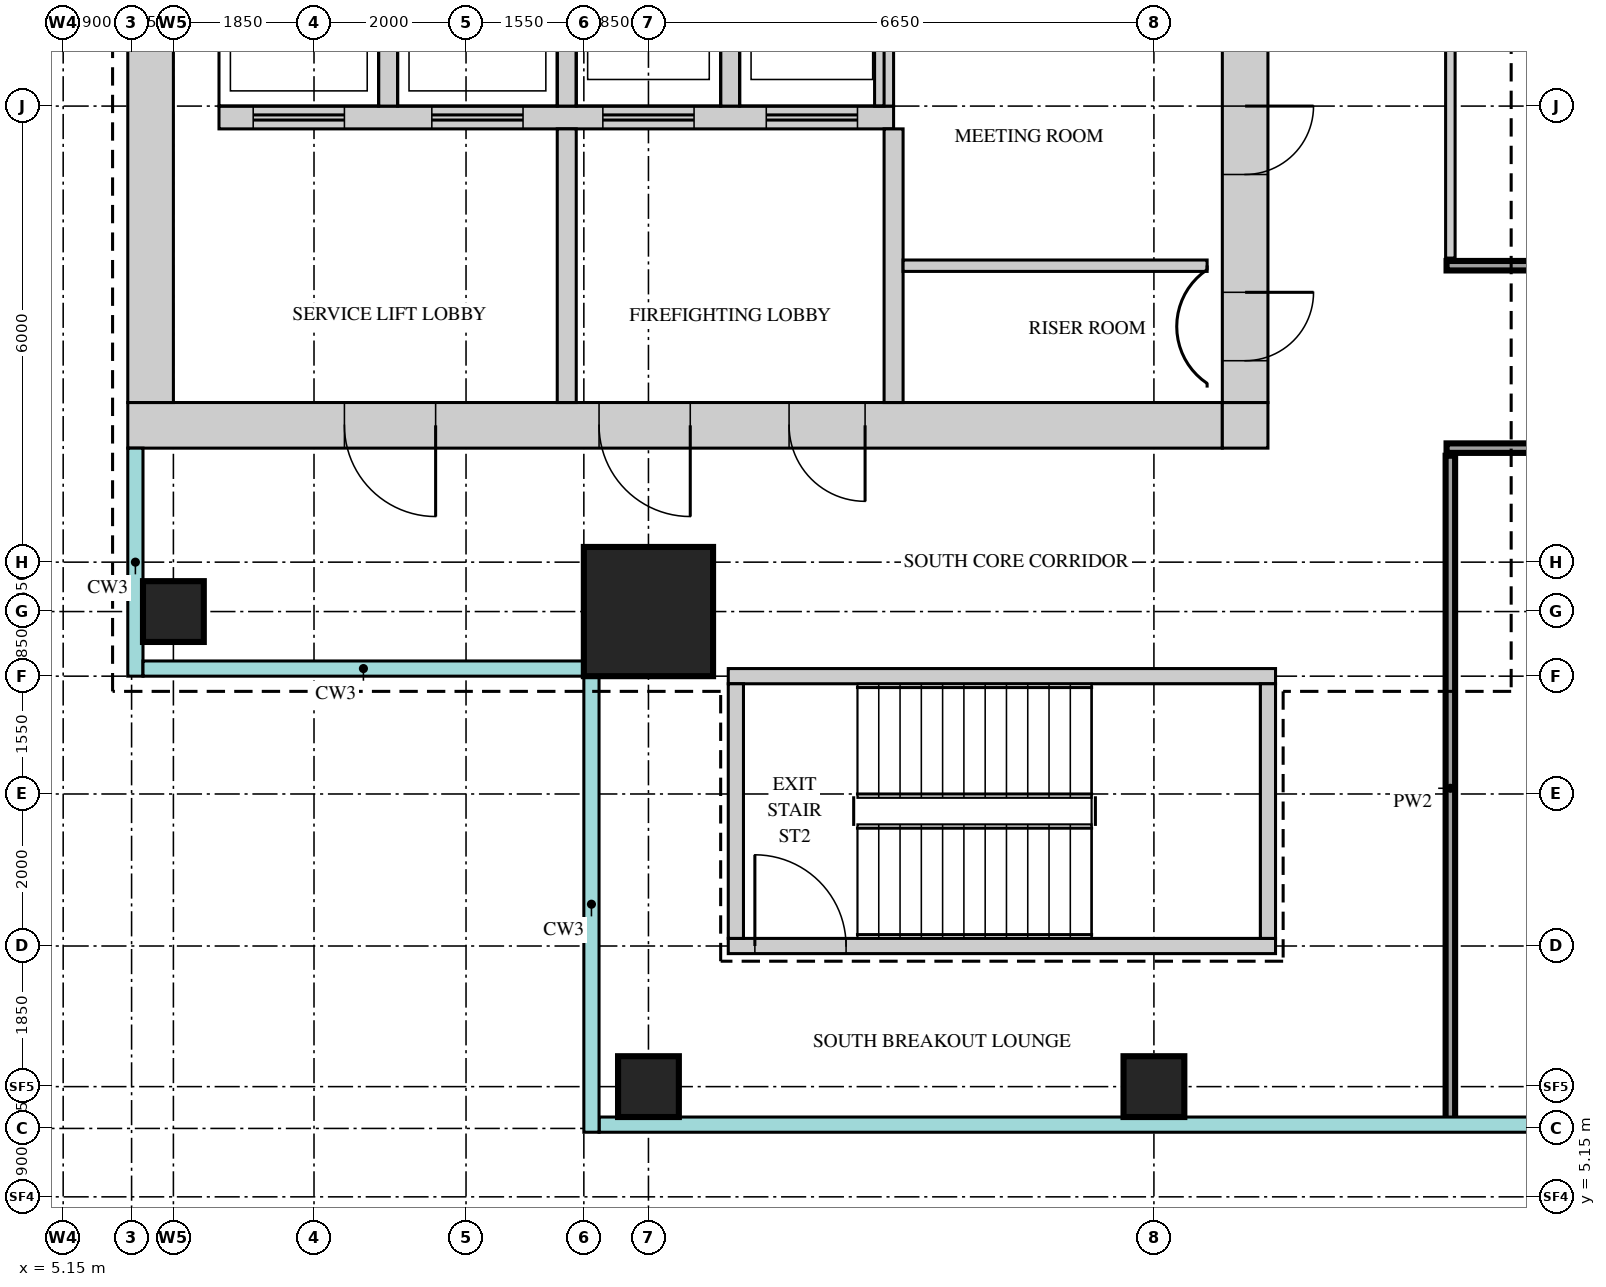
"""IFC4 building model, lengths in metres.
Left out: names, types, materials, properties, quantities, classifications, styles, units other than length and angle.
Written with IfcOpenShell. Run it as: python <this file> out.ifc"""

import sys

from ifc_helpers import new_model, si_unit, direction, frame, frame_2d, origin, origin_2d, place, context, subcontext, project, spatial, rectangle, extrude, source, transform, mapped, element, fill, save


model = new_model("IFC4")
c1 = context("Model", 3, precision=1e-05, world=origin(), true_north=direction((0.0, 1.0)))
c2 = subcontext(c1, "Body", "Model", "MODEL_VIEW")
j1 = project(units=[si_unit("LENGTHUNIT", "METRE"), si_unit("PLANEANGLEUNIT", "RADIAN")], contexts=[c1])
p1 = place(None, origin())
s1 = spatial("IfcSite", under=j1, at=p1, CompositionType="ELEMENT")
p2 = place(p1, origin())
s2 = spatial("IfcBuilding", under=s1, at=p2, CompositionType="ELEMENT")
p3 = place(p2, frame((0.0, 0.0, 310.2)))
s3 = spatial("IfcBuildingStorey", under=s2, at=p3, CompositionType="ELEMENT", Elevation=310.2)
m1 = source(origin(), c2, "Body", "SweptSolid", [
    extrude(rectangle(XDim=14.4, YDim=0.6, at=frame_2d((7.2, 0.0))), origin(), (0.0, 0.0, 1.0), 3.75),
])
p4 = place(p3, frame((6.0, 15.3, 0.0), z_axis=(0.0, 0.0, 1.0), x_axis=(1.0, 0.0, 0.0)))
e1 = element("IfcWall", 1, at=p4, inside=s3, PredefinedType="SHEAR", context=c2, shape_type="MappedRepresentation", body=[
    mapped(m1, transform((0.0, 0.0, 0.0))),
])
m2 = source(origin(), c2, "Body", "SweptSolid", [
    extrude(rectangle(XDim=1.2, YDim=2.1, at=frame_2d((0.6, 1.05))), frame((0.0, 0.31, 0.0), z_axis=(0.0, -1.0, 0.0), x_axis=(1.0, 0.0, 0.0)), (0.0, 0.0, 1.0), 0.62),
])
p5 = place(p4, frame((6.2, 0.0, 0.0)))
e2 = element("IfcOpeningElement", 2, at=p5, cuts=e1, PredefinedType="OPENING", context=c2, shape_type="MappedRepresentation", body=[
    mapped(m2, transform((0.0, 0.0, 0.0))),
])
p6 = place(p4, frame((2.85, 0.0, 0.0)))
e3 = element("IfcOpeningElement", 3, at=p6, cuts=e1, PredefinedType="OPENING", context=c2, shape_type="MappedRepresentation", body=[
    mapped(m2, transform((0.0, 0.0, 0.0))),
])
m3 = source(origin(), c2, "Body", "SweptSolid", [
    extrude(rectangle(XDim=1.0, YDim=2.1, at=frame_2d((0.5, 1.05))), frame((0.0, 0.31, 0.0), z_axis=(0.0, -1.0, 0.0), x_axis=(1.0, 0.0, 0.0)), (0.0, 0.0, 1.0), 0.62),
])
p7 = place(p4, frame((8.7, 0.0, 0.0)))
e4 = element("IfcOpeningElement", 4, at=p7, cuts=e1, PredefinedType="OPENING", context=c2, shape_type="MappedRepresentation", body=[
    mapped(m3, transform((0.0, 0.0, 0.0))),
])
m4 = source(origin(), c2, "Body", "SweptSolid", [
    extrude(rectangle(XDim=0.6, YDim=0.6, at=frame_2d((0.3, 0.0))), origin(), (0.0, 0.0, 1.0), 3.75),
])
p8 = place(p3, frame((20.4, 15.3, 0.0), z_axis=(0.0, 0.0, 1.0), x_axis=(1.0, 0.0, 0.0)))
e5 = element("IfcWall", 5, at=p8, inside=s3, PredefinedType="SHEAR", context=c2, shape_type="MappedRepresentation", body=[
    mapped(m4, transform((0.0, 0.0, 0.0))),
])
m5 = source(origin(), c2, "Body", "SweptSolid", [
    extrude(rectangle(XDim=22.8, YDim=0.6, at=frame_2d((11.4, 0.0))), origin(), (0.0, 0.0, 1.0), 3.75),
])
p9 = place(p3, frame((20.7, 15.6, 0.0), z_axis=(0.0, 0.0, 1.0), x_axis=(0.0, 1.0, 0.0)))
e6 = element("IfcWall", 6, at=p9, inside=s3, PredefinedType="SHEAR", context=c2, shape_type="MappedRepresentation", body=[
    mapped(m5, transform((0.0, 0.0, 0.0))),
])
m6 = source(origin(), c2, "Body", "SweptSolid", [
    extrude(rectangle(XDim=1.8, YDim=2.1, at=frame_2d((0.9, 1.05))), frame((0.0, 0.31, 0.0), z_axis=(0.0, -1.0, 0.0), x_axis=(1.0, 0.0, 0.0)), (0.0, 0.0, 1.0), 0.62),
])
p10 = place(p9, frame((10.9, 0.0, 0.0)))
e7 = element("IfcOpeningElement", 7, at=p10, cuts=e6, PredefinedType="OPENING", context=c2, shape_type="MappedRepresentation", body=[
    mapped(m6, transform((0.0, 0.0, 0.0))),
])
m7 = source(origin(), c2, "Body", "SweptSolid", [
    extrude(rectangle(XDim=0.9, YDim=2.1, at=frame_2d((0.45, 1.05))), frame((0.0, 0.31, 0.0), z_axis=(0.0, -1.0, 0.0), x_axis=(1.0, 0.0, 0.0)), (0.0, 0.0, 1.0), 0.62),
])
p11 = place(p9, frame((0.55, 0.0, 0.0)))
e8 = element("IfcOpeningElement", 8, at=p11, cuts=e6, PredefinedType="OPENING", context=c2, shape_type="MappedRepresentation", body=[
    mapped(m7, transform((0.0, 0.0, 0.0))),
])
p12 = place(p9, frame((3.0, 0.0, 0.0)))
e9 = element("IfcOpeningElement", 9, at=p12, cuts=e6, PredefinedType="OPENING", context=c2, shape_type="MappedRepresentation", body=[
    mapped(m7, transform((0.0, 0.0, 0.0))),
])
p13 = place(p9, frame((5.75, 0.0, 0.0)))
e10 = element("IfcOpeningElement", 10, at=p13, cuts=e6, PredefinedType="OPENING", context=c2, shape_type="MappedRepresentation", body=[
    mapped(m7, transform((0.0, 0.0, 0.0))),
])
p14 = place(p3, frame((6.3, 15.6, 0.0), z_axis=(0.0, 0.0, 1.0), x_axis=(0.0, 1.0, 0.0)))
e11 = element("IfcWall", 11, at=p14, inside=s3, PredefinedType="SHEAR", context=c2, shape_type="MappedRepresentation", body=[
    mapped(m5, transform((0.0, 0.0, 0.0))),
])
m8 = source(origin(), c2, "Body", "SweptSolid", [
    extrude(rectangle(XDim=7.2, YDim=0.2, at=frame_2d((3.6, 0.0))), origin(), (0.0, 0.0, 1.0), 3.75),
])
p15 = place(p3, frame((13.9, 12.0, 0.0), z_axis=(0.0, 0.0, 1.0), x_axis=(1.0, 0.0, 0.0)))
e12 = element("IfcWall", 12, at=p15, inside=s3, PredefinedType="SHEAR", context=c2, shape_type="MappedRepresentation", body=[
    mapped(m8, transform((0.0, 0.0, 0.0))),
])
p16 = place(p3, frame((13.9, 8.45, 0.0), z_axis=(0.0, 0.0, 1.0), x_axis=(1.0, 0.0, 0.0)))
e13 = element("IfcWall", 13, at=p16, inside=s3, PredefinedType="SHEAR", context=c2, shape_type="MappedRepresentation", body=[
    mapped(m8, transform((0.0, 0.0, 0.0))),
])
m9 = source(origin(), c2, "Body", "SweptSolid", [
    extrude(rectangle(XDim=1.2, YDim=2.1, at=frame_2d((0.6, 1.05))), frame((0.0, 0.11, 0.0), z_axis=(0.0, -1.0, 0.0), x_axis=(1.0, 0.0, 0.0)), (0.0, 0.0, 1.0), 0.22),
])
p17 = place(p16, frame((0.35, 0.0, 0.0)))
e14 = element("IfcOpeningElement", 14, at=p17, cuts=e13, PredefinedType="OPENING", context=c2, shape_type="MappedRepresentation", body=[
    mapped(m9, transform((0.0, 0.0, 0.0))),
])
m10 = source(origin(), c2, "Body", "SweptSolid", [
    extrude(rectangle(XDim=3.35, YDim=0.2, at=frame_2d((1.675, 0.0))), origin(), (0.0, 0.0, 1.0), 3.75),
])
for number, where, z_axis, x_axis in (
    (15, (21.0, 8.55, 0.0), (0.0, 0.0, 1.0), (0.0, 1.0, 0.0)),
    (16, (14.0, 8.55, 0.0), (0.0, 0.0, 1.0), (0.0, 1.0, 0.0)),
):
    element("IfcWall", number, at=place(p3, frame(where, z_axis=z_axis, x_axis=x_axis)), inside=s3, PredefinedType="SHEAR", context=c2, shape_type="MappedRepresentation", body=[
        mapped(m10, transform((0.0, 0.0, 0.0))),
    ])
m11 = source(origin(), c2, "Body", "SweptSolid", [
    extrude(rectangle(XDim=8.875, YDim=0.3, at=frame_2d((4.438, 0.0))), origin(), (0.0, 0.0, 1.0), 3.75),
])
p18 = place(p3, frame((7.2, 19.35, 0.0), z_axis=(0.0, 0.0, 1.0), x_axis=(1.0, 0.0, 0.0)))
e17 = element("IfcWall", 17, at=p18, inside=s3, PredefinedType="STANDARD", context=c2, shape_type="MappedRepresentation", body=[
    mapped(m11, transform((0.0, 0.0, 0.0))),
])
m12 = source(origin(), c2, "Body", "SweptSolid", [
    extrude(rectangle(XDim=1.2, YDim=2.1, at=frame_2d((0.6, 1.05))), frame((0.0, 0.16, 0.0), z_axis=(0.0, -1.0, 0.0), x_axis=(1.0, 0.0, 0.0)), (0.0, 0.0, 1.0), 0.32),
])
p19 = place(p18, frame((0.45, 0.0, 0.0)))
e18 = element("IfcOpeningElement", 18, at=p19, cuts=e17, PredefinedType="OPENING", context=c2, shape_type="MappedRepresentation", body=[
    mapped(m12, transform((0.0, 0.0, 0.0))),
])
p20 = place(p18, frame((2.8, 0.0, 0.0)))
e19 = element("IfcOpeningElement", 19, at=p20, cuts=e17, PredefinedType="OPENING", context=c2, shape_type="MappedRepresentation", body=[
    mapped(m12, transform((0.0, 0.0, 0.0))),
])
p21 = place(p18, frame((5.05, 0.0, 0.0)))
e20 = element("IfcOpeningElement", 20, at=p21, cuts=e17, PredefinedType="OPENING", context=c2, shape_type="MappedRepresentation", body=[
    mapped(m12, transform((0.0, 0.0, 0.0))),
])
p22 = place(p18, frame((7.2, 0.0, 0.0)))
e21 = element("IfcOpeningElement", 21, at=p22, cuts=e17, PredefinedType="OPENING", context=c2, shape_type="MappedRepresentation", body=[
    mapped(m12, transform((0.0, 0.0, 0.0))),
])
m13 = source(origin(), c2, "Body", "SweptSolid", [
    extrude(rectangle(XDim=3.1, YDim=0.25, at=frame_2d((1.55, 0.0))), origin(), (0.0, 0.0, 1.0), 3.75),
])
for number, where, z_axis, x_axis in (
    (22, (9.425, 19.5, 0.0), (0.0, 0.0, 1.0), (0.0, 1.0, 0.0)),
    (23, (11.775, 19.5, 0.0), (0.0, 0.0, 1.0), (0.0, 1.0, 0.0)),
    (24, (13.925, 19.5, 0.0), (0.0, 0.0, 1.0), (0.0, 1.0, 0.0)),
    (25, (15.95, 19.5, 0.0), (0.0, 0.0, 1.0), (0.0, 1.0, 0.0)),
):
    element("IfcWall", number, at=place(p3, frame(where, z_axis=z_axis, x_axis=x_axis)), inside=s3, PredefinedType="STANDARD", context=c2, shape_type="MappedRepresentation", body=[
        mapped(m13, transform((0.0, 0.0, 0.0))),
    ])
m14 = source(origin(), c2, "Body", "SweptSolid", [
    extrude(rectangle(XDim=3.6, YDim=0.25, at=frame_2d((1.8, 0.0))), origin(), (0.0, 0.0, 1.0), 3.75),
])
for number, where, z_axis, x_axis in (
    (26, (16.075, 15.6, 0.0), (0.0, 0.0, 1.0), (0.0, 1.0, 0.0)),
    (27, (11.775, 15.6, 0.0), (0.0, 0.0, 1.0), (0.0, 1.0, 0.0)),
):
    element("IfcWall", number, at=place(p3, frame(where, z_axis=z_axis, x_axis=x_axis)), inside=s3, PredefinedType="STANDARD", context=c2, shape_type="MappedRepresentation", body=[
        mapped(m14, transform((0.0, 0.0, 0.0))),
    ])
m15 = source(origin(), c2, "Body", "SweptSolid", [
    extrude(rectangle(XDim=1.7, YDim=1.7, at=origin_2d()), origin(), (0.0, 0.0, 1.0), 3.75),
])
p23 = place(p3, frame((12.85, 12.85, 0.0), z_axis=(0.0, 0.0, 1.0), x_axis=(1.0, 0.0, 0.0)))
e28 = element("IfcColumn", 28, at=p23, inside=s3, PredefinedType="COLUMN", context=c2, shape_type="MappedRepresentation", body=[
    mapped(m15, transform((0.0, 0.0, 0.0))),
])
m16 = source(origin(), c2, "Body", "SweptSolid", [
    extrude(rectangle(XDim=0.8, YDim=0.8, at=origin_2d()), origin(), (0.0, 0.0, 1.0), 3.75),
])
for number, where, z_axis, x_axis in (
    (29, (12.85, 6.6, 0.0), (0.0, 0.0, 1.0), (1.0, 0.0, 0.0)),
    (30, (19.5, 6.6, 0.0), (0.0, 0.0, 1.0), (1.0, 0.0, 0.0)),
    (31, (6.6, 12.85, 0.0), (0.0, 0.0, 1.0), (1.0, 0.0, 0.0)),
):
    element("IfcColumn", number, at=place(p3, frame(where, z_axis=z_axis, x_axis=x_axis)), inside=s3, PredefinedType="COLUMN", context=c2, shape_type="MappedRepresentation", body=[
        mapped(m16, transform((0.0, 0.0, 0.0))),
    ])
m17 = source(origin(), c2, "Body", "SweptSolid", [
    extrude(rectangle(XDim=8.75, YDim=0.125, at=frame_2d((4.375, 0.0))), origin(), (0.0, 0.0, 1.0), 3.8),
])
p24 = place(p3, frame((23.4, 6.15, 0.0), z_axis=(0.0, 0.0, 1.0), x_axis=(0.0, 1.0, 0.0)))
e32 = element("IfcWall", 32, at=p24, inside=s3, PredefinedType="PARTITIONING", context=c2, shape_type="MappedRepresentation", body=[
    mapped(m17, transform((0.0, 0.0, 0.0))),
])
m18 = source(origin(), c2, "Body", "SweptSolid", [
    extrude(rectangle(XDim=19.1, YDim=0.125, at=frame_2d((9.55, 0.0))), origin(), (0.0, 0.0, 1.0), 3.8),
])
p25 = place(p3, frame((23.35, 15.0, 0.0), z_axis=(0.0, 0.0, 1.0), x_axis=(1.0, 0.0, 0.0)))
e33 = element("IfcWall", 33, at=p25, inside=s3, PredefinedType="PARTITIONING", context=c2, shape_type="MappedRepresentation", body=[
    mapped(m18, transform((0.0, 0.0, 0.0))),
])
m19 = source(origin(), c2, "Body", "SweptSolid", [
    extrude(rectangle(XDim=1.2, YDim=2.1, at=frame_2d((0.6, 1.05))), frame((0.0, 0.073, 0.0), z_axis=(0.0, -1.0, 0.0), x_axis=(1.0, 0.0, 0.0)), (0.0, 0.0, 1.0), 0.145),
])
p26 = place(p25, frame((7.75, 0.0, 0.0)))
e34 = element("IfcOpeningElement", 34, at=p26, cuts=e33, PredefinedType="OPENING", context=c2, shape_type="MappedRepresentation", body=[
    mapped(m19, transform((0.0, 0.0, 0.0))),
])
m20 = source(origin(), c2, "Body", "SweptSolid", [
    extrude(rectangle(XDim=4.0, YDim=0.15, at=frame_2d((2.0, 0.0))), origin(), (0.0, 0.0, 1.0), 3.8),
])
p27 = place(p3, frame((16.2, 17.4, 0.0), z_axis=(0.0, 0.0, 1.0), x_axis=(1.0, 0.0, 0.0)))
e35 = element("IfcWall", 35, at=p27, inside=s3, PredefinedType="PARTITIONING", context=c2, shape_type="MappedRepresentation", body=[
    mapped(m20, transform((0.0, 0.0, 0.0))),
])
m21 = source(origin(), c2, "Body", "SweptSolid", [
    extrude(rectangle(XDim=16.7, YDim=0.125, at=frame_2d((8.35, 0.0))), origin(), (0.0, 0.0, 1.0), 3.8),
])
p28 = place(p3, frame((23.35, 17.4, 0.0), z_axis=(0.0, 0.0, 1.0), x_axis=(1.0, 0.0, 0.0)))
e36 = element("IfcWall", 36, at=p28, inside=s3, PredefinedType="PARTITIONING", context=c2, shape_type="MappedRepresentation", body=[
    mapped(m21, transform((0.0, 0.0, 0.0))),
])
p29 = place(p28, frame((7.75, 0.0, 0.0)))
e37 = element("IfcOpeningElement", 37, at=p29, cuts=e36, PredefinedType="OPENING", context=c2, shape_type="MappedRepresentation", body=[
    mapped(m19, transform((0.0, 0.0, 0.0))),
])
m22 = source(origin(), c2, "Body", "SweptSolid", [
    extrude(rectangle(XDim=19.0, YDim=0.125, at=frame_2d((9.5, 0.0))), origin(), (0.0, 0.0, 1.0), 3.8),
])
p30 = place(p3, frame((23.4, 17.5, 0.0), z_axis=(0.0, 0.0, 1.0), x_axis=(0.0, 1.0, 0.0)))
e38 = element("IfcWall", 38, at=p30, inside=s3, PredefinedType="PARTITIONING", context=c2, shape_type="MappedRepresentation", body=[
    mapped(m22, transform((0.0, 0.0, 0.0))),
])
m23 = source(origin(), c2, "Body", "SweptSolid", [
    extrude(rectangle(XDim=0.9, YDim=2.1, at=frame_2d((0.45, 1.05))), frame((0.0, 0.073, 0.0), z_axis=(0.0, -1.0, 0.0), x_axis=(1.0, 0.0, 0.0)), (0.0, 0.0, 1.0), 0.145),
])
p31 = place(p30, frame((10.4, 0.0, 0.0)))
e39 = element("IfcOpeningElement", 39, at=p31, cuts=e38, PredefinedType="OPENING", context=c2, shape_type="MappedRepresentation", body=[
    mapped(m23, transform((0.0, 0.0, 0.0))),
])
m24 = source(origin(), c2, "Body", "SweptSolid", [
    extrude(rectangle(XDim=0.9, YDim=2.1, at=frame_2d((0.45, 1.05))), frame((0.0, 0.25, 0.0), z_axis=(0.0, -1.0, 0.0), x_axis=(1.0, 0.0, 0.0)), (0.0, 0.0, 1.0), 0.5),
])
p32 = place(p11, origin())
e40 = element("IfcDoor", 40, at=p32, inside=s3, OperationType="SINGLE_SWING_RIGHT", PredefinedType="DOOR", context=c2, shape_type="MappedRepresentation", body=[
    mapped(m24, transform((0.0, 0.0, 0.0))),
])
fill(e8, e40)
p33 = place(p12, origin())
e41 = element("IfcDoor", 41, at=p33, inside=s3, OperationType="SINGLE_SWING_RIGHT", PredefinedType="DOOR", context=c2, shape_type="MappedRepresentation", body=[
    mapped(m24, transform((0.0, 0.0, 0.0))),
])
fill(e9, e41)
m25 = source(origin(), c2, "Body", "SweptSolid", [
    extrude(rectangle(XDim=1.2, YDim=2.1, at=frame_2d((0.6, 1.05))), frame((0.0, 0.25, 0.0), z_axis=(0.0, -1.0, 0.0), x_axis=(1.0, 0.0, 0.0)), (0.0, 0.0, 1.0), 0.5),
])
p34 = place(p5, origin())
e42 = element("IfcDoor", 42, at=p34, inside=s3, OperationType="SINGLE_SWING_RIGHT", PredefinedType="DOOR", context=c2, shape_type="MappedRepresentation", body=[
    mapped(m25, transform((0.0, 0.0, 0.0))),
])
fill(e2, e42)
p35 = place(p6, origin())
e43 = element("IfcDoor", 43, at=p35, inside=s3, OperationType="SINGLE_SWING_RIGHT", PredefinedType="DOOR", context=c2, shape_type="MappedRepresentation", body=[
    mapped(m25, transform((0.0, 0.0, 0.0))),
])
fill(e3, e43)
m26 = source(origin(), c2, "Body", "SweptSolid", [
    extrude(rectangle(XDim=1.0, YDim=2.1, at=frame_2d((0.5, 1.05))), frame((0.0, 0.25, 0.0), z_axis=(0.0, -1.0, 0.0), x_axis=(1.0, 0.0, 0.0)), (0.0, 0.0, 1.0), 0.5),
])
p36 = place(p7, origin())
e44 = element("IfcDoor", 44, at=p36, inside=s3, OperationType="SINGLE_SWING_RIGHT", PredefinedType="DOOR", context=c2, shape_type="MappedRepresentation", body=[
    mapped(m26, transform((0.0, 0.0, 0.0))),
])
fill(e4, e44)
m27 = source(origin(), c2, "Body", "SweptSolid", [
    extrude(rectangle(XDim=1.2, YDim=2.1, at=frame_2d((0.6, 1.05))), frame((0.0, 0.025, 0.0), z_axis=(0.0, -1.0, 0.0), x_axis=(1.0, 0.0, 0.0)), (0.0, 0.0, 1.0), 0.05),
])
p37 = place(p17, origin())
e45 = element("IfcDoor", 45, at=p37, inside=s3, OperationType="SINGLE_SWING_RIGHT", PredefinedType="DOOR", context=c2, shape_type="MappedRepresentation", body=[
    mapped(m27, transform((0.0, 0.0, 0.0))),
])
fill(e14, e45)
p38 = place(p19, origin())
e46 = element("IfcDoor", 46, at=p38, inside=s3, OperationType="DOUBLE_DOOR_SLIDING", PredefinedType="DOOR", context=c2, shape_type="MappedRepresentation", body=[
    mapped(m27, transform((0.0, 0.0, 0.0))),
])
fill(e18, e46)
p39 = place(p20, origin())
e47 = element("IfcDoor", 47, at=p39, inside=s3, OperationType="DOUBLE_DOOR_SLIDING", PredefinedType="DOOR", context=c2, shape_type="MappedRepresentation", body=[
    mapped(m27, transform((0.0, 0.0, 0.0))),
])
fill(e19, e47)
p40 = place(p21, origin())
e48 = element("IfcDoor", 48, at=p40, inside=s3, OperationType="DOUBLE_DOOR_SLIDING", PredefinedType="DOOR", context=c2, shape_type="MappedRepresentation", body=[
    mapped(m27, transform((0.0, 0.0, 0.0))),
])
fill(e20, e48)
p41 = place(p22, origin())
e49 = element("IfcDoor", 49, at=p41, inside=s3, OperationType="DOUBLE_DOOR_SLIDING", PredefinedType="DOOR", context=c2, shape_type="MappedRepresentation", body=[
    mapped(m27, transform((0.0, 0.0, 0.0))),
])
fill(e21, e49)
save(model, sys.argv[1])
